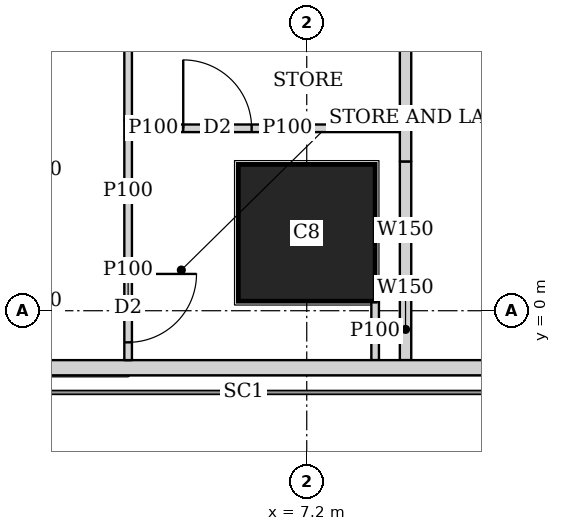
"""IFC4 building model, lengths in metres.
Left out: names, types, materials, properties, quantities, classifications, styles, units other than length and angle.
Written with IfcOpenShell. Run it as: python <this file> out.ifc"""

import sys

from ifc_helpers import new_model, si_unit, direction, frame, frame_2d, origin, origin_2d, place, context, subcontext, project, spatial, rectangle, extrude, element, fill, save


model = new_model("IFC4")
c1 = context("Model", 3, precision=1e-05, world=origin(), true_north=direction((0.0, 1.0)))
c2 = subcontext(c1, "Body", "Model", "MODEL_VIEW")
j1 = project(units=[si_unit("LENGTHUNIT", "METRE"), si_unit("PLANEANGLEUNIT", "RADIAN")], contexts=[c1])
p1 = place(None, origin())
s1 = spatial("IfcSite", under=j1, at=p1, CompositionType="ELEMENT")
p2 = place(p1, origin())
s2 = spatial("IfcBuilding", under=s1, at=p2, CompositionType="ELEMENT")
p3 = place(p2, frame((0.0, 0.0, 139.55)))
s3 = spatial("IfcBuildingStorey", under=s2, at=p3, CompositionType="ELEMENT", Elevation=139.55)
p4 = place(p3, frame((7.2, 1.025, 0.0), z_axis=(0.0, 0.0, 1.0), x_axis=(1.0, 0.0, 0.0)))
e1 = element("IfcColumn", 1, at=p4, inside=s3, PredefinedType="COLUMN", context=c2, shape_type="SweptSolid", body=[
    extrude(rectangle(XDim=1.8, YDim=1.8, at=origin_2d()), origin(), (0.0, 0.0, 1.0), 3.75),
])
p5 = place(p3, frame((2.163, -0.75, 0.0), z_axis=(0.0, 0.0, 1.0), x_axis=(1.0, 0.0, 0.0)))
e2 = element("IfcWall", 2, at=p5, inside=s3, PredefinedType="SOLIDWALL", context=c2, shape_type="SweptSolid", body=[
    extrude(rectangle(XDim=45.628, YDim=0.2, at=frame_2d((22.814, 0.0))), origin(), (0.0, 0.0, 1.0), 3.5),
])
p6 = place(p5, frame((9.537, 0.0, 0.9)))
e3 = element("IfcOpeningElement", 3, at=p6, cuts=e2, PredefinedType="OPENING", context=c2, shape_type="SweptSolid", body=[
    extrude(rectangle(XDim=1.8, YDim=1.5, at=frame_2d((0.9, 0.75))), frame((0.0, 0.11, 0.0), z_axis=(0.0, -1.0, 0.0), x_axis=(1.0, 0.0, 0.0)), (0.0, 0.0, 1.0), 0.22),
])
p7 = place(p5, frame((13.137, 0.0, 0.9)))
e4 = element("IfcOpeningElement", 4, at=p7, cuts=e2, PredefinedType="OPENING", context=c2, shape_type="SweptSolid", body=[
    extrude(rectangle(XDim=1.8, YDim=1.5, at=frame_2d((0.9, 0.75))), frame((0.0, 0.11, 0.0), z_axis=(0.0, -1.0, 0.0), x_axis=(1.0, 0.0, 0.0)), (0.0, 0.0, 1.0), 0.22),
])
p8 = place(p5, frame((16.737, 0.0, 0.9)))
e5 = element("IfcOpeningElement", 5, at=p8, cuts=e2, PredefinedType="OPENING", context=c2, shape_type="SweptSolid", body=[
    extrude(rectangle(XDim=1.8, YDim=1.5, at=frame_2d((0.9, 0.75))), frame((0.0, 0.11, 0.0), z_axis=(0.0, -1.0, 0.0), x_axis=(1.0, 0.0, 0.0)), (0.0, 0.0, 1.0), 0.22),
])
p9 = place(p5, frame((20.337, 0.0, 0.9)))
e6 = element("IfcOpeningElement", 6, at=p9, cuts=e2, PredefinedType="OPENING", context=c2, shape_type="SweptSolid", body=[
    extrude(rectangle(XDim=1.8, YDim=1.5, at=frame_2d((0.9, 0.75))), frame((0.0, 0.11, 0.0), z_axis=(0.0, -1.0, 0.0), x_axis=(1.0, 0.0, 0.0)), (0.0, 0.0, 1.0), 0.22),
])
p10 = place(p5, frame((23.937, 0.0, 0.9)))
e7 = element("IfcOpeningElement", 7, at=p10, cuts=e2, PredefinedType="OPENING", context=c2, shape_type="SweptSolid", body=[
    extrude(rectangle(XDim=1.8, YDim=1.5, at=frame_2d((0.9, 0.75))), frame((0.0, 0.11, 0.0), z_axis=(0.0, -1.0, 0.0), x_axis=(1.0, 0.0, 0.0)), (0.0, 0.0, 1.0), 0.22),
])
p11 = place(p5, frame((27.537, 0.0, 0.9)))
e8 = element("IfcOpeningElement", 8, at=p11, cuts=e2, PredefinedType="OPENING", context=c2, shape_type="SweptSolid", body=[
    extrude(rectangle(XDim=1.8, YDim=1.5, at=frame_2d((0.9, 0.75))), frame((0.0, 0.11, 0.0), z_axis=(0.0, -1.0, 0.0), x_axis=(1.0, 0.0, 0.0)), (0.0, 0.0, 1.0), 0.22),
])
p12 = place(p5, frame((31.137, 0.0, 0.9)))
e9 = element("IfcOpeningElement", 9, at=p12, cuts=e2, PredefinedType="OPENING", context=c2, shape_type="SweptSolid", body=[
    extrude(rectangle(XDim=1.8, YDim=1.5, at=frame_2d((0.9, 0.75))), frame((0.0, 0.11, 0.0), z_axis=(0.0, -1.0, 0.0), x_axis=(1.0, 0.0, 0.0)), (0.0, 0.0, 1.0), 0.22),
])
p13 = place(p5, frame((34.737, 0.0, 0.9)))
e10 = element("IfcOpeningElement", 10, at=p13, cuts=e2, PredefinedType="OPENING", context=c2, shape_type="SweptSolid", body=[
    extrude(rectangle(XDim=1.8, YDim=1.5, at=frame_2d((0.9, 0.75))), frame((0.0, 0.11, 0.0), z_axis=(0.0, -1.0, 0.0), x_axis=(1.0, 0.0, 0.0)), (0.0, 0.0, 1.0), 0.22),
])
p14 = place(p3, frame((8.5, -0.65, 0.0), z_axis=(0.0, 0.0, 1.0), x_axis=(0.0, 1.0, 0.0)))
e11 = element("IfcWall", 11, at=p14, inside=s3, PredefinedType="SOLIDWALL", context=c2, shape_type="SweptSolid", body=[
    extrude(rectangle(XDim=0.809, YDim=0.15, at=frame_2d((0.404, 0.0))), origin(), (0.0, 0.0, 1.0), 3.5),
])
p15 = place(p3, frame((8.5, 0.159, 0.0), z_axis=(0.0, 0.0, 1.0), x_axis=(0.0, 1.0, 0.0)))
e12 = element("IfcWall", 12, at=p15, inside=s3, PredefinedType="SOLIDWALL", context=c2, shape_type="SweptSolid", body=[
    extrude(rectangle(XDim=1.805, YDim=0.15, at=frame_2d((0.903, 0.0))), origin(), (0.0, 0.0, 1.0), 2.1),
])
p16 = place(p3, frame((8.5, 1.964, 0.0), z_axis=(0.0, 0.0, 1.0), x_axis=(0.0, 1.0, 0.0)))
e13 = element("IfcWall", 13, at=p16, inside=s3, PredefinedType="SOLIDWALL", context=c2, shape_type="SweptSolid", body=[
    extrude(rectangle(XDim=41.097, YDim=0.15, at=frame_2d((20.548, 0.0))), origin(), (0.0, 0.0, 1.0), 3.5),
])
p17 = place(p16, frame((6.911, 0.0, 0.0)))
e14 = element("IfcOpeningElement", 14, at=p17, cuts=e13, PredefinedType="OPENING", context=c2, shape_type="SweptSolid", body=[
    extrude(rectangle(XDim=1.0, YDim=2.1, at=frame_2d((0.5, 1.05))), frame((0.0, 0.085, 0.0), z_axis=(0.0, -1.0, 0.0), x_axis=(1.0, 0.0, 0.0)), (0.0, 0.0, 1.0), 0.17),
])
p18 = place(p16, frame((10.661, 0.0, 0.0)))
e15 = element("IfcOpeningElement", 15, at=p18, cuts=e13, PredefinedType="OPENING", context=c2, shape_type="SweptSolid", body=[
    extrude(rectangle(XDim=1.0, YDim=2.1, at=frame_2d((0.5, 1.05))), frame((0.0, 0.085, 0.0), z_axis=(0.0, -1.0, 0.0), x_axis=(1.0, 0.0, 0.0)), (0.0, 0.0, 1.0), 0.17),
])
p19 = place(p16, frame((25.661, 0.0, 0.0)))
e16 = element("IfcOpeningElement", 16, at=p19, cuts=e13, PredefinedType="OPENING", context=c2, shape_type="SweptSolid", body=[
    extrude(rectangle(XDim=1.0, YDim=2.1, at=frame_2d((0.5, 1.05))), frame((0.0, 0.085, 0.0), z_axis=(0.0, -1.0, 0.0), x_axis=(1.0, 0.0, 0.0)), (0.0, 0.0, 1.0), 0.17),
])
p20 = place(p16, frame((33.161, 0.0, 0.0)))
e17 = element("IfcOpeningElement", 17, at=p20, cuts=e13, PredefinedType="OPENING", context=c2, shape_type="SweptSolid", body=[
    extrude(rectangle(XDim=1.0, YDim=2.1, at=frame_2d((0.5, 1.05))), frame((0.0, 0.085, 0.0), z_axis=(0.0, -1.0, 0.0), x_axis=(1.0, 0.0, 0.0)), (0.0, 0.0, 1.0), 0.17),
])
p21 = place(p3, frame((8.1, 0.124, 0.0), z_axis=(0.0, 0.0, 1.0), x_axis=(0.0, -1.0, 0.0)))
e18 = element("IfcWall", 18, at=p21, inside=s3, PredefinedType="PARTITIONING", context=c2, shape_type="SweptSolid", body=[
    extrude(rectangle(XDim=0.774, YDim=0.1, at=frame_2d((0.387, 0.0))), origin(), (0.0, 0.0, 1.0), 3.5),
])
p22 = place(p3, frame((4.85, -0.65, 0.0), z_axis=(0.0, 0.0, 1.0), x_axis=(0.0, 1.0, 0.0)))
e19 = element("IfcWall", 19, at=p22, inside=s3, PredefinedType="PARTITIONING", context=c2, shape_type="SweptSolid", body=[
    extrude(rectangle(XDim=1.284, YDim=0.1, at=frame_2d((0.642, 0.0))), origin(), (0.0, 0.0, 1.0), 3.5),
])
p23 = place(p22, frame((0.234, 0.0, 0.0)))
e20 = element("IfcOpeningElement", 20, at=p23, cuts=e19, PredefinedType="OPENING", context=c2, shape_type="SweptSolid", body=[
    extrude(rectangle(XDim=0.9, YDim=2.1, at=frame_2d((0.45, 1.05))), frame((0.0, 0.06, 0.0), z_axis=(0.0, -1.0, 0.0), x_axis=(1.0, 0.0, 0.0)), (0.0, 0.0, 1.0), 0.12),
])
p24 = place(p3, frame((4.85, 0.634, 0.0), z_axis=(0.0, 0.0, 1.0), x_axis=(0.0, 1.0, 0.0)))
e21 = element("IfcWall", 21, at=p24, inside=s3, PredefinedType="PARTITIONING", context=c2, shape_type="SweptSolid", body=[
    extrude(rectangle(XDim=1.871, YDim=0.1, at=frame_2d((0.936, 0.0))), origin(), (0.0, 0.0, 1.0), 2.1),
])
p25 = place(p3, frame((4.85, 2.505, 0.0), z_axis=(0.0, 0.0, 1.0), x_axis=(0.0, 1.0, 0.0)))
e22 = element("IfcWall", 22, at=p25, inside=s3, PredefinedType="PARTITIONING", context=c2, shape_type="SweptSolid", body=[
    extrude(rectangle(XDim=4.995, YDim=0.1, at=frame_2d((2.498, 0.0))), origin(), (0.0, 0.0, 1.0), 3.5),
])
p26 = place(p25, frame((3.52, 0.0, 0.0)))
e23 = element("IfcOpeningElement", 23, at=p26, cuts=e22, PredefinedType="OPENING", context=c2, shape_type="SweptSolid", body=[
    extrude(rectangle(XDim=0.9, YDim=2.1, at=frame_2d((0.45, 1.05))), frame((0.0, 0.06, 0.0), z_axis=(0.0, -1.0, 0.0), x_axis=(1.0, 0.0, 0.0)), (0.0, 0.0, 1.0), 0.12),
])
p27 = place(p25, frame((1.645, 0.0, 0.0)))
e24 = element("IfcOpeningElement", 24, at=p27, cuts=e22, PredefinedType="OPENING", context=c2, shape_type="SweptSolid", body=[
    extrude(rectangle(XDim=0.9, YDim=2.1, at=frame_2d((0.45, 1.05))), frame((0.0, 0.06, 0.0), z_axis=(0.0, -1.0, 0.0), x_axis=(1.0, 0.0, 0.0)), (0.0, 0.0, 1.0), 0.12),
])
p28 = place(p3, frame((5.467, 2.4, 0.0), z_axis=(0.0, 0.0, 1.0), x_axis=(1.0, 0.0, 0.0)))
e25 = element("IfcWall", 25, at=p28, inside=s3, PredefinedType="PARTITIONING", context=c2, shape_type="SweptSolid", body=[
    extrude(rectangle(XDim=2.958, YDim=0.1, at=frame_2d((1.479, 0.0))), origin(), (0.0, 0.0, 1.0), 3.5),
])
p29 = place(p28, frame((0.108, 0.0, 0.0)))
e26 = element("IfcOpeningElement", 26, at=p29, cuts=e25, PredefinedType="OPENING", context=c2, shape_type="SweptSolid", body=[
    extrude(rectangle(XDim=0.9, YDim=2.1, at=frame_2d((0.45, 1.05))), frame((0.0, 0.06, 0.0), z_axis=(0.0, -1.0, 0.0), x_axis=(1.0, 0.0, 0.0)), (0.0, 0.0, 1.0), 0.12),
])
p30 = place(p3, frame((5.467, 2.4, 0.0), z_axis=(0.0, 0.0, 1.0), x_axis=(-1.0, 0.0, 0.0)))
e27 = element("IfcWall", 27, at=p30, inside=s3, PredefinedType="PARTITIONING", context=c2, shape_type="SweptSolid", body=[
    extrude(rectangle(XDim=0.567, YDim=0.1, at=frame_2d((0.284, 0.0))), origin(), (0.0, 0.0, 1.0), 2.1),
])
p31 = place(p23, origin())
e28 = element("IfcDoor", 28, at=p31, inside=s3, OperationType="SINGLE_SWING_LEFT", PredefinedType="DOOR", context=c2, shape_type="SweptSolid", body=[
    extrude(rectangle(XDim=0.9, YDim=2.1, at=frame_2d((0.45, 1.05))), frame((0.0, 0.025, 0.0), z_axis=(0.0, -1.0, 0.0), x_axis=(1.0, 0.0, 0.0)), (0.0, 0.0, 1.0), 0.05),
])
fill(e20, e28)
p32 = place(p29, origin())
e29 = element("IfcDoor", 29, at=p32, inside=s3, OperationType="SINGLE_SWING_LEFT", PredefinedType="DOOR", context=c2, shape_type="SweptSolid", body=[
    extrude(rectangle(XDim=0.9, YDim=2.1, at=frame_2d((0.45, 1.05))), frame((0.0, 0.025, 0.0), z_axis=(0.0, -1.0, 0.0), x_axis=(1.0, 0.0, 0.0)), (0.0, 0.0, 1.0), 0.05),
])
fill(e26, e29)
save(model, sys.argv[1])
